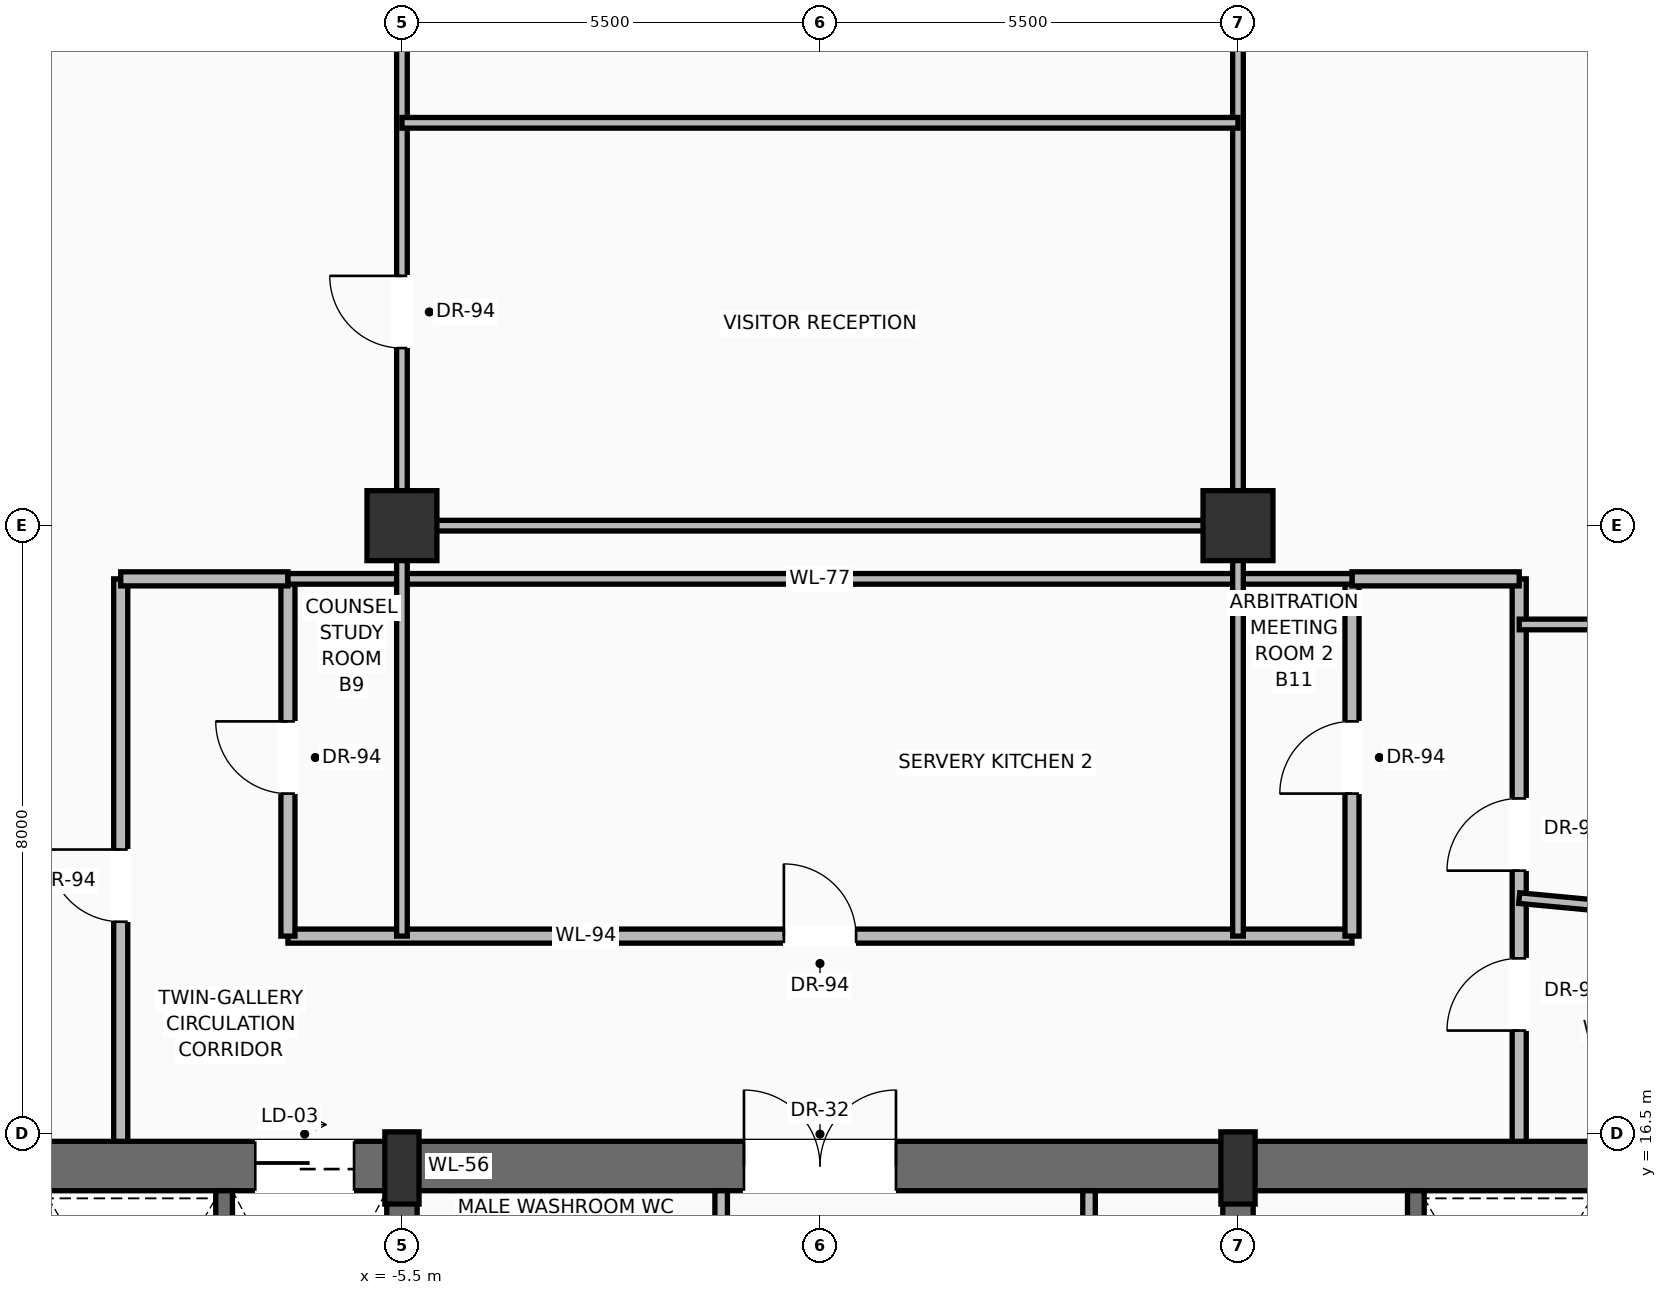
"""IFC4 building model, lengths in metres.
Left out: names, types, materials, properties, quantities, classifications, styles, units other than length and angle.
Written with IfcOpenShell. Run it as: python <this file> out.ifc"""

import sys

from ifc_helpers import new_model, si_unit, direction, frame, frame_2d, origin, origin_2d, place, context, subcontext, project, spatial, rectangle, extrude, source, transform, mapped, element, fill, save


model = new_model("IFC4")
c1 = context("Model", 3, precision=1e-05, world=origin(), true_north=direction((0.0, 1.0)))
c2 = subcontext(c1, "Body", "Model", "MODEL_VIEW")
j1 = project(units=[si_unit("LENGTHUNIT", "METRE"), si_unit("PLANEANGLEUNIT", "RADIAN")], contexts=[c1])
p1 = place(None, origin())
s1 = spatial("IfcSite", under=j1, at=p1, CompositionType="ELEMENT")
p2 = place(p1, origin())
s2 = spatial("IfcBuilding", under=s1, at=p2, CompositionType="ELEMENT")
p3 = place(p2, frame((0.0, 0.0, 208.0)))
s3 = spatial("IfcBuildingStorey", under=s2, at=p3, CompositionType="ELEMENT", Elevation=208.0)
p4 = place(p3, frame((-10.8, 16.075, 0.0), z_axis=(0.0, 0.0, 1.0), x_axis=(1.0, 0.0, 0.0)))
e1 = element("IfcWall", 1, at=p4, inside=s3, PredefinedType="SHEAR", context=c2, shape_type="SweptSolid", body=[
    extrude(rectangle(XDim=21.6, YDim=0.65, at=frame_2d((10.8, 0.0))), origin(), (0.0, 0.0, 1.0), 3.47),
])
p5 = place(p4, frame((3.37, 0.0, 0.0)))
e2 = element("IfcOpeningElement", 2, at=p5, cuts=e1, PredefinedType="OPENING", context=c2, shape_type="SweptSolid", body=[
    extrude(rectangle(XDim=1.3, YDim=2.3, at=frame_2d((0.65, 1.15))), frame((0.0, 0.335, 0.0), z_axis=(0.0, -1.0, 0.0), x_axis=(1.0, 0.0, 0.0)), (0.0, 0.0, 1.0), 0.67),
])
p6 = place(p4, frame((9.8, 0.0, 0.0)))
e3 = element("IfcOpeningElement", 3, at=p6, cuts=e1, PredefinedType="OPENING", context=c2, shape_type="SweptSolid", body=[
    extrude(rectangle(XDim=2.0, YDim=2.4, at=frame_2d((1.0, 1.2))), frame((0.0, 0.335, 0.0), z_axis=(0.0, -1.0, 0.0), x_axis=(1.0, 0.0, 0.0)), (0.0, 0.0, 1.0), 0.67),
])
p7 = place(p3, frame((-5.5, 0.525, 0.0), z_axis=(0.0, 0.0, 1.0), x_axis=(0.0, 1.0, 0.0)))
e4 = element("IfcWall", 4, at=p7, inside=s3, PredefinedType="SHEAR", context=c2, shape_type="SweptSolid", body=[
    extrude(rectangle(XDim=15.55, YDim=0.4, at=frame_2d((7.775, 0.0))), origin(), (0.0, 0.0, 1.0), 3.47),
])
p8 = place(p7, frame((8.975, 0.0, 0.0)))
e5 = element("IfcOpeningElement", 5, at=p8, cuts=e4, PredefinedType="OPENING", context=c2, shape_type="SweptSolid", body=[
    extrude(rectangle(XDim=1.1, YDim=2.2, at=frame_2d((0.55, 1.1))), frame((0.0, 0.21, 0.0), z_axis=(0.0, -1.0, 0.0), x_axis=(1.0, 0.0, 0.0)), (0.0, 0.0, 1.0), 0.42),
])
p9 = place(p3, frame((5.5, 0.525, 0.0), z_axis=(0.0, 0.0, 1.0), x_axis=(0.0, 1.0, 0.0)))
e6 = element("IfcWall", 6, at=p9, inside=s3, PredefinedType="SHEAR", context=c2, shape_type="SweptSolid", body=[
    extrude(rectangle(XDim=15.55, YDim=0.4, at=frame_2d((7.775, 0.0))), origin(), (0.0, 0.0, 1.0), 3.47),
])
p10 = place(p9, frame((8.975, 0.0, 0.0)))
e7 = element("IfcOpeningElement", 7, at=p10, cuts=e6, PredefinedType="OPENING", context=c2, shape_type="SweptSolid", body=[
    extrude(rectangle(XDim=1.1, YDim=2.2, at=frame_2d((0.55, 1.1))), frame((0.0, 0.21, 0.0), z_axis=(0.0, -1.0, 0.0), x_axis=(1.0, 0.0, 0.0)), (0.0, 0.0, 1.0), 0.42),
])
m1 = source(origin(), c2, "Body", "SweptSolid", [
    extrude(rectangle(XDim=0.45, YDim=0.95, at=origin_2d()), origin(), (0.0, 0.0, 1.0), 3.7),
])
for number, where, z_axis, x_axis in (
    (8, (-5.5, 16.05, 0.0), (0.0, 0.0, 1.0), (1.0, 0.0, 0.0)),
    (9, (5.5, 16.05, 0.0), (0.0, 0.0, 1.0), (1.0, 0.0, 0.0)),
):
    element("IfcColumn", number, at=place(p3, frame(where, z_axis=z_axis, x_axis=x_axis)), inside=s3, PredefinedType="PILASTER", context=c2, shape_type="MappedRepresentation", body=[
        mapped(m1, transform((0.0, 0.0, 0.0), scale=1.0)),
    ])
m2 = source(origin(), c2, "Body", "SweptSolid", [
    extrude(rectangle(XDim=0.92, YDim=0.92, at=origin_2d()), origin(), (0.0, 0.0, 1.0), 3.7),
])
for number, where, z_axis, x_axis in (
    (10, (-5.5, 24.5, 0.0), (0.0, 0.0, 1.0), (1.0, 0.0, 0.0)),
    (11, (5.5, 24.5, 0.0), (0.0, 0.0, 1.0), (1.0, 0.0, 0.0)),
):
    element("IfcColumn", number, at=place(p3, frame(where, z_axis=z_axis, x_axis=x_axis)), inside=s3, PredefinedType="COLUMN", context=c2, shape_type="MappedRepresentation", body=[
        mapped(m2, transform((0.0, 0.0, 0.0), scale=1.0)),
    ])
p11 = place(p3, frame((-20.048, 15.833, 0.0), z_axis=(0.0, 0.0, 1.0), x_axis=(0.518922930311, 0.854821029455, 0.0)))
e12 = element("IfcWall", 12, at=p11, inside=s3, PredefinedType="SOLIDWALL", context=c2, shape_type="SweptSolid", body=[
    extrude(rectangle(XDim=19.158, YDim=0.28, at=frame_2d((9.579, 0.0))), origin(), (0.0, 0.0, 1.0), 3.05),
])
p12 = place(p11, frame((4.598, 0.0, 0.0)))
e13 = element("IfcOpeningElement", 13, at=p12, cuts=e12, PredefinedType="OPENING", context=c2, shape_type="SweptSolid", body=[
    extrude(rectangle(XDim=1.6, YDim=2.35, at=frame_2d((0.8, 1.175))), frame((0.0, 0.15, 0.0), z_axis=(0.0, -1.0, 0.0), x_axis=(1.0, 0.0, 0.0)), (0.0, 0.0, 1.0), 0.3),
])
p13 = place(p11, frame((13.027, 0.0, 0.9)))
e14 = element("IfcOpeningElement", 14, at=p13, cuts=e12, PredefinedType="OPENING", context=c2, shape_type="SweptSolid", body=[
    extrude(rectangle(XDim=1.55, YDim=1.85, at=frame_2d((0.775, 0.925))), frame((0.0, 0.15, 0.0), z_axis=(0.0, -1.0, 0.0), x_axis=(1.0, 0.0, 0.0)), (0.0, 0.0, 1.0), 0.3),
])
p14 = place(p3, frame((9.318, 32.292, 0.0), z_axis=(0.0, 0.0, 1.0), x_axis=(0.532974477416, -0.846131317482, 0.0)))
e15 = element("IfcWall", 15, at=p14, inside=s3, PredefinedType="SOLIDWALL", context=c2, shape_type="SweptSolid", body=[
    extrude(rectangle(XDim=19.199, YDim=0.28, at=frame_2d((9.599, 0.0))), origin(), (0.0, 0.0, 1.0), 3.05),
])
p15 = place(p14, frame((4.608, 0.0, 0.0)))
e16 = element("IfcOpeningElement", 16, at=p15, cuts=e15, PredefinedType="OPENING", context=c2, shape_type="SweptSolid", body=[
    extrude(rectangle(XDim=1.6, YDim=2.35, at=frame_2d((0.8, 1.175))), frame((0.0, 0.15, 0.0), z_axis=(0.0, -1.0, 0.0), x_axis=(1.0, 0.0, 0.0)), (0.0, 0.0, 1.0), 0.3),
])
p16 = place(p14, frame((13.055, 0.0, 0.9)))
e17 = element("IfcOpeningElement", 17, at=p16, cuts=e15, PredefinedType="OPENING", context=c2, shape_type="SweptSolid", body=[
    extrude(rectangle(XDim=1.55, YDim=1.85, at=frame_2d((0.775, 0.925))), frame((0.0, 0.15, 0.0), z_axis=(0.0, -1.0, 0.0), x_axis=(1.0, 0.0, 0.0)), (0.0, 0.0, 1.0), 0.3),
])
for number, where, z_axis, x_axis in (
    (18, (-7.84, 11.87, 0.0), (0.0, 0.0, 1.0), (0.0, 1.0, 0.0)),
    (19, (7.84, 11.87, 0.0), (0.0, 0.0, 1.0), (0.0, 1.0, 0.0)),
):
    element("IfcWall", number, at=place(p3, frame(where, z_axis=z_axis, x_axis=x_axis)), inside=s3, PredefinedType="SOLIDWALL", context=c2, shape_type="SweptSolid", body=[
        extrude(rectangle(XDim=3.88, YDim=0.22, at=frame_2d((1.94, 0.0))), origin(), (0.0, 0.0, 1.0), 3.47),
    ])
p17 = place(p3, frame((-1.3, 13.6, 0.0), z_axis=(0.0, 0.0, 1.0), x_axis=(0.0, 1.0, 0.0)))
e20 = element("IfcWall", 20, at=p17, inside=s3, PredefinedType="PARTITIONING", context=c2, shape_type="SweptSolid", body=[
    extrude(rectangle(XDim=2.15, YDim=0.165, at=frame_2d((1.075, 0.0))), origin(), (0.0, 0.0, 1.0), 3.462),
])
p18 = place(p17, frame((0.55, 0.0, 0.0)))
e21 = element("IfcOpeningElement", 21, at=p18, cuts=e20, PredefinedType="OPENING", context=c2, shape_type="SweptSolid", body=[
    extrude(rectangle(XDim=0.9, YDim=2.1, at=frame_2d((0.45, 1.05))), frame((0.0, 0.093, 0.0), z_axis=(0.0, -1.0, 0.0), x_axis=(1.0, 0.0, 0.0)), (0.0, 0.0, 1.0), 0.185),
])
p19 = place(p3, frame((3.54, 11.22, 0.0), z_axis=(0.0, 0.0, 1.0), x_axis=(0.0, 1.0, 0.0)))
e22 = element("IfcWall", 22, at=p19, inside=s3, PredefinedType="PARTITIONING", context=c2, shape_type="SweptSolid", body=[
    extrude(rectangle(XDim=4.53, YDim=0.165, at=frame_2d((2.265, 0.0))), origin(), (0.0, 0.0, 1.0), 3.462),
])
p20 = place(p19, frame((1.25, 0.0, 0.0)))
e23 = element("IfcOpeningElement", 23, at=p20, cuts=e22, PredefinedType="OPENING", context=c2, shape_type="SweptSolid", body=[
    extrude(rectangle(XDim=0.9, YDim=2.1, at=frame_2d((0.45, 1.05))), frame((0.0, 0.093, 0.0), z_axis=(0.0, -1.0, 0.0), x_axis=(1.0, 0.0, 0.0)), (0.0, 0.0, 1.0), 0.185),
])
p21 = place(p3, frame((-7.0, 19.1, 0.0), z_axis=(0.0, 0.0, 1.0), x_axis=(1.0, 0.0, 0.0)))
e24 = element("IfcWall", 24, at=p21, inside=s3, PredefinedType="PARTITIONING", context=c2, shape_type="SweptSolid", body=[
    extrude(rectangle(XDim=14.0, YDim=0.185, at=frame_2d((7.0, 0.0))), origin(), (0.0, 0.0, 1.0), 2.846),
])
p22 = place(p21, frame((6.525, 0.0, 0.0)))
e25 = element("IfcOpeningElement", 25, at=p22, cuts=e24, PredefinedType="OPENING", context=c2, shape_type="SweptSolid", body=[
    extrude(rectangle(XDim=0.95, YDim=2.2, at=frame_2d((0.475, 1.1))), frame((0.0, 0.103, 0.0), z_axis=(0.0, -1.0, 0.0), x_axis=(1.0, 0.0, 0.0)), (0.0, 0.0, 1.0), 0.205),
])
p23 = place(p3, frame((-7.0, 19.1, 0.0), z_axis=(0.0, 0.0, 1.0), x_axis=(0.0, 1.0, 0.0)))
e26 = element("IfcWall", 26, at=p23, inside=s3, PredefinedType="PARTITIONING", context=c2, shape_type="SweptSolid", body=[
    extrude(rectangle(XDim=4.7, YDim=0.185, at=frame_2d((2.35, 0.0))), origin(), (0.0, 0.0, 1.0), 3.462),
])
p24 = place(p23, frame((1.875, 0.0, 0.0)))
e27 = element("IfcOpeningElement", 27, at=p24, cuts=e26, PredefinedType="OPENING", context=c2, shape_type="SweptSolid", body=[
    extrude(rectangle(XDim=0.95, YDim=2.2, at=frame_2d((0.475, 1.1))), frame((0.0, 0.103, 0.0), z_axis=(0.0, -1.0, 0.0), x_axis=(1.0, 0.0, 0.0)), (0.0, 0.0, 1.0), 0.205),
])
p25 = place(p3, frame((7.0, 19.1, 0.0), z_axis=(0.0, 0.0, 1.0), x_axis=(0.0, 1.0, 0.0)))
e28 = element("IfcWall", 28, at=p25, inside=s3, PredefinedType="PARTITIONING", context=c2, shape_type="SweptSolid", body=[
    extrude(rectangle(XDim=4.7, YDim=0.185, at=frame_2d((2.35, 0.0))), origin(), (0.0, 0.0, 1.0), 3.462),
])
p26 = place(p25, frame((1.875, 0.0, 0.0)))
e29 = element("IfcOpeningElement", 29, at=p26, cuts=e28, PredefinedType="OPENING", context=c2, shape_type="SweptSolid", body=[
    extrude(rectangle(XDim=0.95, YDim=2.2, at=frame_2d((0.475, 1.1))), frame((0.0, 0.103, 0.0), z_axis=(0.0, -1.0, 0.0), x_axis=(1.0, 0.0, 0.0)), (0.0, 0.0, 1.0), 0.205),
])
p27 = place(p3, frame((-9.2, 16.4, 0.0), z_axis=(0.0, 0.0, 1.0), x_axis=(0.0, 1.0, 0.0)))
e30 = element("IfcWall", 30, at=p27, inside=s3, PredefinedType="PARTITIONING", context=c2, shape_type="SweptSolid", body=[
    extrude(rectangle(XDim=7.4, YDim=0.185, at=frame_2d((3.7, 0.0))), origin(), (0.0, 0.0, 1.0), 3.462),
])
p28 = place(p27, frame((2.889, 0.0, 0.0)))
e31 = element("IfcOpeningElement", 31, at=p28, cuts=e30, PredefinedType="OPENING", context=c2, shape_type="SweptSolid", body=[
    extrude(rectangle(XDim=0.95, YDim=2.2, at=frame_2d((0.475, 1.1))), frame((0.0, 0.103, 0.0), z_axis=(0.0, -1.0, 0.0), x_axis=(1.0, 0.0, 0.0)), (0.0, 0.0, 1.0), 0.205),
])
p29 = place(p3, frame((9.2, 16.4, 0.0), z_axis=(0.0, 0.0, 1.0), x_axis=(0.0, 1.0, 0.0)))
e32 = element("IfcWall", 32, at=p29, inside=s3, PredefinedType="PARTITIONING", context=c2, shape_type="SweptSolid", body=[
    extrude(rectangle(XDim=7.4, YDim=0.185, at=frame_2d((3.7, 0.0))), origin(), (0.0, 0.0, 1.0), 3.462),
])
p30 = place(p29, frame((3.561, 0.0, 0.0)))
e33 = element("IfcOpeningElement", 33, at=p30, cuts=e32, PredefinedType="OPENING", context=c2, shape_type="SweptSolid", body=[
    extrude(rectangle(XDim=0.95, YDim=2.2, at=frame_2d((0.475, 1.1))), frame((0.0, 0.103, 0.0), z_axis=(0.0, -1.0, 0.0), x_axis=(1.0, 0.0, 0.0)), (0.0, 0.0, 1.0), 0.205),
])
p31 = place(p29, frame((1.457, 0.0, 0.0)))
e34 = element("IfcOpeningElement", 34, at=p31, cuts=e32, PredefinedType="OPENING", context=c2, shape_type="SweptSolid", body=[
    extrude(rectangle(XDim=0.95, YDim=2.2, at=frame_2d((0.475, 1.1))), frame((0.0, 0.103, 0.0), z_axis=(0.0, -1.0, 0.0), x_axis=(1.0, 0.0, 0.0)), (0.0, 0.0, 1.0), 0.205),
])
for number, where, z_axis, x_axis in (
    (35, (-9.2, 23.8, 0.0), (0.0, 0.0, 1.0), (1.0, 0.0, 0.0)),
    (36, (7.0, 23.8, 0.0), (0.0, 0.0, 1.0), (1.0, 0.0, 0.0)),
):
    element("IfcWall", number, at=place(p3, frame(where, z_axis=z_axis, x_axis=x_axis)), inside=s3, PredefinedType="PARTITIONING", context=c2, shape_type="SweptSolid", body=[
        extrude(rectangle(XDim=2.2, YDim=0.185, at=frame_2d((1.1, 0.0))), origin(), (0.0, 0.0, 1.0), 3.462),
    ])
p32 = place(p3, frame((-7.0, 23.8, 0.0), z_axis=(0.0, 0.0, 1.0), x_axis=(1.0, 0.0, 0.0)))
e37 = element("IfcWall", 37, at=p32, inside=s3, PredefinedType="PARTITIONING", context=c2, shape_type="SweptSolid", body=[
    extrude(rectangle(XDim=14.0, YDim=0.14, at=frame_2d((7.0, 0.0))), origin(), (0.0, 0.0, 1.0), 3.462),
])
p33 = place(p3, frame((-5.5, 19.1, 0.0), z_axis=(0.0, 0.0, 1.0), x_axis=(0.0, 1.0, 0.0)))
e38 = element("IfcWall", 38, at=p33, inside=s3, PredefinedType="PARTITIONING", context=c2, shape_type="SweptSolid", body=[
    extrude(rectangle(XDim=13.4, YDim=0.14, at=frame_2d((6.7, 0.0))), origin(), (0.0, 0.0, 1.0), 2.846),
])
p34 = place(p33, frame((7.736, 0.0, 0.0)))
e39 = element("IfcOpeningElement", 39, at=p34, cuts=e38, PredefinedType="OPENING", context=c2, shape_type="SweptSolid", body=[
    extrude(rectangle(XDim=0.95, YDim=2.2, at=frame_2d((0.475, 1.1))), frame((0.0, 0.08, 0.0), z_axis=(0.0, -1.0, 0.0), x_axis=(1.0, 0.0, 0.0)), (0.0, 0.0, 1.0), 0.16),
])
p35 = place(p3, frame((5.5, 19.1, 0.0), z_axis=(0.0, 0.0, 1.0), x_axis=(0.0, 1.0, 0.0)))
e40 = element("IfcWall", 40, at=p35, inside=s3, PredefinedType="PARTITIONING", context=c2, shape_type="SweptSolid", body=[
    extrude(rectangle(XDim=13.4, YDim=0.14, at=frame_2d((6.7, 0.0))), origin(), (0.0, 0.0, 1.0), 2.846),
])
p36 = place(p3, frame((-5.5, 24.5, 0.0), z_axis=(0.0, 0.0, 1.0), x_axis=(1.0, 0.0, 0.0)))
e41 = element("IfcWall", 41, at=p36, inside=s3, PredefinedType="PARTITIONING", context=c2, shape_type="SweptSolid", body=[
    extrude(rectangle(XDim=11.0, YDim=0.14, at=frame_2d((5.5, 0.0))), origin(), (0.0, 0.0, 1.0), 2.846),
])
p37 = place(p3, frame((-5.5, 29.8, 0.0), z_axis=(0.0, 0.0, 1.0), x_axis=(1.0, 0.0, 0.0)))
e42 = element("IfcWall", 42, at=p37, inside=s3, PredefinedType="PARTITIONING", context=c2, shape_type="SweptSolid", body=[
    extrude(rectangle(XDim=11.0, YDim=0.14, at=frame_2d((5.5, 0.0))), origin(), (0.0, 0.0, 1.0), 3.462),
])
p38 = place(p3, frame((9.2, 19.6, 0.0), z_axis=(0.0, 0.0, 1.0), x_axis=(0.995630126913, -0.093384422598, 0.0)))
e43 = element("IfcWall", 43, at=p38, inside=s3, PredefinedType="PARTITIONING", context=c2, shape_type="SweptSolid", body=[
    extrude(rectangle(XDim=8.823, YDim=0.14, at=frame_2d((4.412, 0.0))), origin(), (0.0, 0.0, 1.0), 3.049),
])
p39 = place(p3, frame((9.2, 23.2, 0.0), z_axis=(0.0, 0.0, 1.0), x_axis=(1.0, 0.0, 0.0)))
e44 = element("IfcWall", 44, at=p39, inside=s3, PredefinedType="PARTITIONING", context=c2, shape_type="SweptSolid", body=[
    extrude(rectangle(XDim=5.998, YDim=0.14, at=frame_2d((2.999, 0.0))), origin(), (0.0, 0.0, 1.0), 3.462),
])
m3 = source(origin(), c2, "Body", "SweptSolid", [
    extrude(rectangle(XDim=1.3, YDim=2.3, at=frame_2d((0.65, 1.15))), frame((0.0, 0.025, 0.0), z_axis=(0.0, -1.0, 0.0), x_axis=(1.0, 0.0, 0.0)), (0.0, 0.0, 1.0), 0.05),
])
p40 = place(p5, origin())
e45 = element("IfcDoor", 45, at=p40, inside=s3, OperationType="SLIDING_TO_RIGHT", PredefinedType="DOOR", context=c2, shape_type="MappedRepresentation", body=[
    mapped(m3, transform((0.0, 0.0, 0.0), scale=1.0)),
])
fill(e2, e45)
m4 = source(origin(), c2, "Body", "SweptSolid", [
    extrude(rectangle(XDim=2.0, YDim=2.4, at=frame_2d((1.0, 1.2))), frame((0.0, 0.025, 0.0), z_axis=(0.0, -1.0, 0.0), x_axis=(1.0, 0.0, 0.0)), (0.0, 0.0, 1.0), 0.05),
])
p41 = place(p6, origin())
e46 = element("IfcDoor", 46, at=p41, inside=s3, OperationType="DOUBLE_DOOR_SINGLE_SWING", PredefinedType="DOOR", context=c2, shape_type="MappedRepresentation", body=[
    mapped(m4, transform((0.0, 0.0, 0.0), scale=1.0)),
])
fill(e3, e46)
m5 = source(origin(), c2, "Body", "SweptSolid", [
    extrude(rectangle(XDim=0.95, YDim=2.2, at=frame_2d((0.475, 1.1))), frame((0.0, 0.025, 0.0), z_axis=(0.0, -1.0, 0.0), x_axis=(1.0, 0.0, 0.0)), (0.0, 0.0, 1.0), 0.05),
])
p42 = place(p22, origin())
e47 = element("IfcDoor", 47, at=p42, inside=s3, OperationType="SINGLE_SWING_LEFT", PredefinedType="DOOR", context=c2, shape_type="MappedRepresentation", body=[
    mapped(m5, transform((0.0, 0.0, 0.0), scale=1.0)),
])
fill(e25, e47)
p43 = place(p28, origin())
e48 = element("IfcDoor", 48, at=p43, inside=s3, OperationType="SINGLE_SWING_RIGHT", PredefinedType="DOOR", context=c2, shape_type="MappedRepresentation", body=[
    mapped(m5, transform((0.0, 0.0, 0.0), scale=1.0)),
])
fill(e31, e48)
p44 = place(p30, origin())
e49 = element("IfcDoor", 49, at=p44, inside=s3, OperationType="SINGLE_SWING_LEFT", PredefinedType="DOOR", context=c2, shape_type="MappedRepresentation", body=[
    mapped(m5, transform((0.0, 0.0, 0.0), scale=1.0)),
])
fill(e33, e49)
p45 = place(p31, origin())
e50 = element("IfcDoor", 50, at=p45, inside=s3, OperationType="SINGLE_SWING_LEFT", PredefinedType="DOOR", context=c2, shape_type="MappedRepresentation", body=[
    mapped(m5, transform((0.0, 0.0, 0.0), scale=1.0)),
])
fill(e34, e50)
p46 = place(p24, origin())
e51 = element("IfcDoor", 51, at=p46, inside=s3, OperationType="SINGLE_SWING_RIGHT", PredefinedType="DOOR", context=c2, shape_type="MappedRepresentation", body=[
    mapped(m5, transform((0.0, 0.0, 0.0), scale=1.0)),
])
fill(e27, e51)
p47 = place(p26, origin())
e52 = element("IfcDoor", 52, at=p47, inside=s3, OperationType="SINGLE_SWING_LEFT", PredefinedType="DOOR", context=c2, shape_type="MappedRepresentation", body=[
    mapped(m5, transform((0.0, 0.0, 0.0), scale=1.0)),
])
fill(e29, e52)
p48 = place(p34, origin())
e53 = element("IfcDoor", 53, at=p48, inside=s3, OperationType="SINGLE_SWING_RIGHT", PredefinedType="DOOR", context=c2, shape_type="MappedRepresentation", body=[
    mapped(m5, transform((0.0, 0.0, 0.0), scale=1.0)),
])
fill(e39, e53)
save(model, sys.argv[1])
